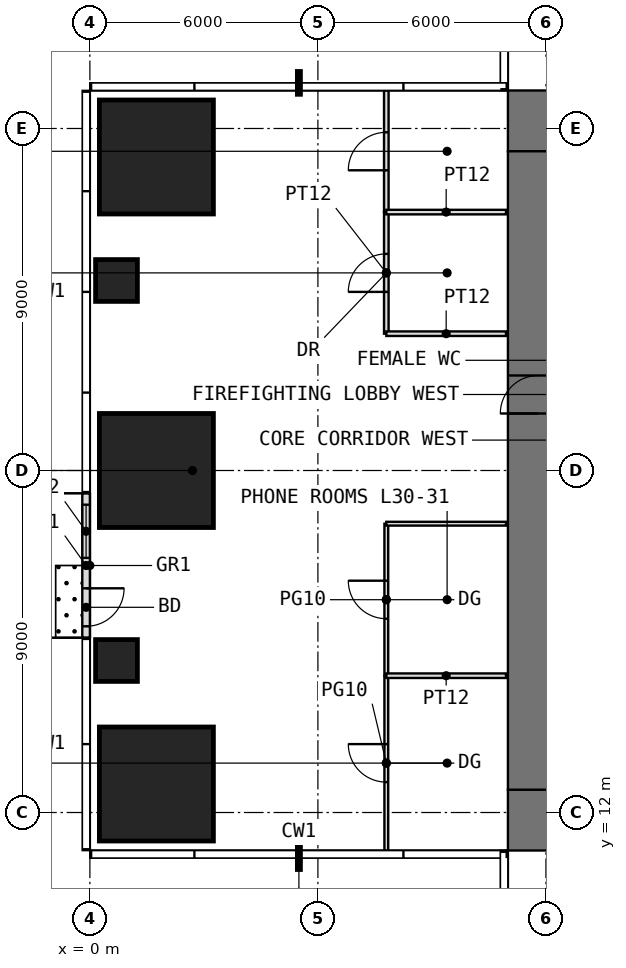
"""IFC4 building model, lengths in metres.
Left out: names, types, materials, properties, quantities, classifications, styles, units other than length and angle.
Written with IfcOpenShell. Run it as: python <this file> out.ifc"""

import sys

from ifc_helpers import new_model, si_unit, direction, frame, frame_2d, origin, origin_2d, place, context, subcontext, project, spatial, rectangle, extrude, element, fill, save


model = new_model("IFC4")
c1 = context("Model", 3, precision=1e-05, world=origin(), true_north=direction((0.0, 1.0)))
c2 = subcontext(c1, "Body", "Model", "MODEL_VIEW")
j1 = project(units=[si_unit("LENGTHUNIT", "METRE"), si_unit("PLANEANGLEUNIT", "RADIAN")], contexts=[c1])
p1 = place(None, origin())
s1 = spatial("IfcSite", under=j1, at=p1, CompositionType="ELEMENT")
p2 = place(p1, origin())
s2 = spatial("IfcBuilding", under=s1, at=p2, CompositionType="ELEMENT")
p3 = place(p2, frame((0.0, 0.0, 128.5)))
s3 = spatial("IfcBuildingStorey", under=s2, at=p3, CompositionType="ELEMENT", Elevation=128.5)
p4 = place(p3, frame((1.75, 12.75, 0.0), z_axis=(0.0, 0.0, 1.0), x_axis=(1.0, 0.0, 0.0)))
e1 = element("IfcColumn", 1, at=p4, inside=s3, PredefinedType="COLUMN", context=c2, shape_type="SweptSolid", body=[
    extrude(rectangle(XDim=3.0, YDim=3.0, at=origin_2d()), origin(), (0.0, 0.0, 1.0), 4.0),
])
p5 = place(p3, frame((0.7, 16.0, 0.0), z_axis=(0.0, 0.0, 1.0), x_axis=(1.0, 0.0, 0.0)))
e2 = element("IfcColumn", 2, at=p5, inside=s3, PredefinedType="COLUMN", context=c2, shape_type="SweptSolid", body=[
    extrude(rectangle(XDim=1.1, YDim=1.1, at=origin_2d()), origin(), (0.0, 0.0, 1.0), 4.0),
])
p6 = place(p3, frame((1.75, 21.0, 0.0), z_axis=(0.0, 0.0, 1.0), x_axis=(1.0, 0.0, 0.0)))
e3 = element("IfcColumn", 3, at=p6, inside=s3, PredefinedType="COLUMN", context=c2, shape_type="SweptSolid", body=[
    extrude(rectangle(XDim=3.0, YDim=3.0, at=origin_2d()), origin(), (0.0, 0.0, 1.0), 4.0),
])
p7 = place(p3, frame((0.7, 26.0, 0.0), z_axis=(0.0, 0.0, 1.0), x_axis=(1.0, 0.0, 0.0)))
e4 = element("IfcColumn", 4, at=p7, inside=s3, PredefinedType="COLUMN", context=c2, shape_type="SweptSolid", body=[
    extrude(rectangle(XDim=1.1, YDim=1.1, at=origin_2d()), origin(), (0.0, 0.0, 1.0), 4.0),
])
p8 = place(p3, frame((1.75, 29.25, 0.0), z_axis=(0.0, 0.0, 1.0), x_axis=(1.0, 0.0, 0.0)))
e5 = element("IfcColumn", 5, at=p8, inside=s3, PredefinedType="COLUMN", context=c2, shape_type="SweptSolid", body=[
    extrude(rectangle(XDim=3.0, YDim=3.0, at=origin_2d()), origin(), (0.0, 0.0, 1.0), 4.0),
])
p9 = place(p3, frame((-0.1, 20.4, 0.0), z_axis=(0.0, 0.0, 1.0), x_axis=(0.0, -1.0, 0.0)))
e6 = element("IfcWall", 6, at=p9, inside=s3, PredefinedType="USERDEFINED", context=c2, shape_type="SweptSolid", body=[
    extrude(rectangle(XDim=3.8, YDim=0.2, at=frame_2d((1.9, 0.0))), origin(), (0.0, 0.0, 1.0), 3.75),
])
p10 = place(p9, frame((2.5, 0.0, 0.0)))
e7 = element("IfcOpeningElement", 7, at=p10, cuts=e6, PredefinedType="OPENING", context=c2, shape_type="SweptSolid", body=[
    extrude(rectangle(XDim=1.0, YDim=2.4, at=frame_2d((0.5, 1.2))), frame((0.0, 0.11, 0.0), z_axis=(0.0, -1.0, 0.0), x_axis=(1.0, 0.0, 0.0)), (0.0, 0.0, 1.0), 0.22),
])
p11 = place(p9, frame((0.3, 0.0, 0.3)))
e8 = element("IfcOpeningElement", 8, at=p11, cuts=e6, PredefinedType="OPENING", context=c2, shape_type="SweptSolid", body=[
    extrude(rectangle(XDim=1.4, YDim=2.7, at=frame_2d((0.7, 1.35))), frame((0.0, 0.11, 0.0), z_axis=(0.0, -1.0, 0.0), x_axis=(1.0, 0.0, 0.0)), (0.0, 0.0, 1.0), 0.22),
])
p12 = place(p3, frame((11.0, 11.8, -0.05), z_axis=(0.0, 0.0, 1.0), x_axis=(1.0, 0.0, 0.0)))
e9 = element("IfcWall", 9, at=p12, inside=s3, PredefinedType="SHEAR", context=c2, shape_type="SweptSolid", body=[
    extrude(rectangle(XDim=20.0, YDim=1.6, at=frame_2d((10.0, 0.0))), origin(), (0.0, 0.0, 1.0), 4.0),
])
p13 = place(p12, frame((9.0, 0.0, 0.05)))
e10 = element("IfcOpeningElement", 10, at=p13, cuts=e9, PredefinedType="OPENING", context=c2, shape_type="SweptSolid", body=[
    extrude(rectangle(XDim=2.0, YDim=2.2, at=frame_2d((1.0, 1.1))), frame((0.0, 0.81, 0.0), z_axis=(0.0, -1.0, 0.0), x_axis=(1.0, 0.0, 0.0)), (0.0, 0.0, 1.0), 1.62),
])
p14 = place(p3, frame((11.0, 30.2, -0.05), z_axis=(0.0, 0.0, 1.0), x_axis=(1.0, 0.0, 0.0)))
e11 = element("IfcWall", 11, at=p14, inside=s3, PredefinedType="SHEAR", context=c2, shape_type="SweptSolid", body=[
    extrude(rectangle(XDim=20.0, YDim=1.6, at=frame_2d((10.0, 0.0))), origin(), (0.0, 0.0, 1.0), 4.0),
])
p15 = place(p14, frame((9.0, 0.0, 0.05)))
e12 = element("IfcOpeningElement", 12, at=p15, cuts=e11, PredefinedType="OPENING", context=c2, shape_type="SweptSolid", body=[
    extrude(rectangle(XDim=2.0, YDim=2.2, at=frame_2d((1.0, 1.1))), frame((0.0, 0.81, 0.0), z_axis=(0.0, -1.0, 0.0), x_axis=(1.0, 0.0, 0.0)), (0.0, 0.0, 1.0), 1.62),
])
p16 = place(p3, frame((11.8, 12.6, -0.05), z_axis=(0.0, 0.0, 1.0), x_axis=(0.0, 1.0, 0.0)))
e13 = element("IfcWall", 13, at=p16, inside=s3, PredefinedType="SHEAR", context=c2, shape_type="SweptSolid", body=[
    extrude(rectangle(XDim=16.8, YDim=1.6, at=frame_2d((8.4, 0.0))), origin(), (0.0, 0.0, 1.0), 4.0),
])
p17 = place(p16, frame((9.9, 0.0, 0.05)))
e14 = element("IfcOpeningElement", 14, at=p17, cuts=e13, PredefinedType="OPENING", context=c2, shape_type="SweptSolid", body=[
    extrude(rectangle(XDim=1.0, YDim=2.2, at=frame_2d((0.5, 1.1))), frame((0.0, 0.81, 0.0), z_axis=(0.0, -1.0, 0.0), x_axis=(1.0, 0.0, 0.0)), (0.0, 0.0, 1.0), 1.62),
])
p18 = place(p3, frame((7.8, 11.0, 0.0), z_axis=(0.0, 0.0, 1.0), x_axis=(0.0, 1.0, 0.0)))
e15 = element("IfcWall", 15, at=p18, inside=s3, PredefinedType="PARTITIONING", context=c2, shape_type="SweptSolid", body=[
    extrude(rectangle(XDim=4.6, YDim=0.1, at=frame_2d((2.3, 0.0))), origin(), (0.0, 0.0, 1.0), 3.75),
])
p19 = place(p18, frame((1.8, 0.0, 0.0)))
e16 = element("IfcOpeningElement", 16, at=p19, cuts=e15, PredefinedType="OPENING", context=c2, shape_type="SweptSolid", body=[
    extrude(rectangle(XDim=1.0, YDim=2.4, at=frame_2d((0.5, 1.2))), frame((0.0, 0.06, 0.0), z_axis=(0.0, -1.0, 0.0), x_axis=(1.0, 0.0, 0.0)), (0.0, 0.0, 1.0), 0.12),
])
p20 = place(p3, frame((7.8, 15.6, 0.0), z_axis=(0.0, 0.0, 1.0), x_axis=(0.0, 1.0, 0.0)))
e17 = element("IfcWall", 17, at=p20, inside=s3, PredefinedType="PARTITIONING", context=c2, shape_type="SweptSolid", body=[
    extrude(rectangle(XDim=4.0, YDim=0.1, at=frame_2d((2.0, 0.0))), origin(), (0.0, 0.0, 1.0), 3.75),
])
p21 = place(p20, frame((1.5, 0.0, 0.0)))
e18 = element("IfcOpeningElement", 18, at=p21, cuts=e17, PredefinedType="OPENING", context=c2, shape_type="SweptSolid", body=[
    extrude(rectangle(XDim=1.0, YDim=2.4, at=frame_2d((0.5, 1.2))), frame((0.0, 0.06, 0.0), z_axis=(0.0, -1.0, 0.0), x_axis=(1.0, 0.0, 0.0)), (0.0, 0.0, 1.0), 0.12),
])
p22 = place(p3, frame((7.8, 15.6, 0.0), z_axis=(0.0, 0.0, 1.0), x_axis=(1.0, 0.0, 0.0)))
e19 = element("IfcWall", 19, at=p22, inside=s3, PredefinedType="PARTITIONING", context=c2, shape_type="SweptSolid", body=[
    extrude(rectangle(XDim=3.15, YDim=0.12, at=frame_2d((1.575, 0.0))), origin(), (0.0, 0.0, 1.0), 3.75),
])
p23 = place(p3, frame((7.8, 19.6, 0.0), z_axis=(0.0, 0.0, 1.0), x_axis=(1.0, 0.0, 0.0)))
e20 = element("IfcWall", 20, at=p23, inside=s3, PredefinedType="PARTITIONING", context=c2, shape_type="SweptSolid", body=[
    extrude(rectangle(XDim=3.15, YDim=0.1, at=frame_2d((1.575, 0.0))), origin(), (0.0, 0.0, 1.0), 3.75),
])
p24 = place(p3, frame((7.8, 24.6, 0.0), z_axis=(0.0, 0.0, 1.0), x_axis=(0.0, 1.0, 0.0)))
e21 = element("IfcWall", 21, at=p24, inside=s3, PredefinedType="PARTITIONING", context=c2, shape_type="SweptSolid", body=[
    extrude(rectangle(XDim=3.2, YDim=0.12, at=frame_2d((1.6, 0.0))), origin(), (0.0, 0.0, 1.0), 3.75),
])
p25 = place(p24, frame((1.1, 0.0, 0.0)))
e22 = element("IfcOpeningElement", 22, at=p25, cuts=e21, PredefinedType="OPENING", context=c2, shape_type="SweptSolid", body=[
    extrude(rectangle(XDim=1.0, YDim=2.2, at=frame_2d((0.5, 1.1))), frame((0.0, 0.07, 0.0), z_axis=(0.0, -1.0, 0.0), x_axis=(1.0, 0.0, 0.0)), (0.0, 0.0, 1.0), 0.14),
])
p26 = place(p3, frame((7.8, 24.6, 0.0), z_axis=(0.0, 0.0, 1.0), x_axis=(1.0, 0.0, 0.0)))
e23 = element("IfcWall", 23, at=p26, inside=s3, PredefinedType="PARTITIONING", context=c2, shape_type="SweptSolid", body=[
    extrude(rectangle(XDim=3.15, YDim=0.12, at=frame_2d((1.575, 0.0))), origin(), (0.0, 0.0, 1.0), 3.75),
])
p27 = place(p3, frame((7.8, 27.8, 0.0), z_axis=(0.0, 0.0, 1.0), x_axis=(0.0, 1.0, 0.0)))
e24 = element("IfcWall", 24, at=p27, inside=s3, PredefinedType="PARTITIONING", context=c2, shape_type="SweptSolid", body=[
    extrude(rectangle(XDim=3.2, YDim=0.12, at=frame_2d((1.6, 0.0))), origin(), (0.0, 0.0, 1.0), 3.75),
])
p28 = place(p27, frame((1.1, 0.0, 0.0)))
e25 = element("IfcOpeningElement", 25, at=p28, cuts=e24, PredefinedType="OPENING", context=c2, shape_type="SweptSolid", body=[
    extrude(rectangle(XDim=1.0, YDim=2.2, at=frame_2d((0.5, 1.1))), frame((0.0, 0.07, 0.0), z_axis=(0.0, -1.0, 0.0), x_axis=(1.0, 0.0, 0.0)), (0.0, 0.0, 1.0), 0.14),
])
p29 = place(p3, frame((7.8, 27.8, 0.0), z_axis=(0.0, 0.0, 1.0), x_axis=(1.0, 0.0, 0.0)))
e26 = element("IfcWall", 26, at=p29, inside=s3, PredefinedType="PARTITIONING", context=c2, shape_type="SweptSolid", body=[
    extrude(rectangle(XDim=3.15, YDim=0.12, at=frame_2d((1.575, 0.0))), origin(), (0.0, 0.0, 1.0), 3.75),
])
p30 = place(p10, origin())
e27 = element("IfcDoor", 27, at=p30, inside=s3, OperationType="SINGLE_SWING_LEFT", PredefinedType="DOOR", context=c2, shape_type="SweptSolid", body=[
    extrude(rectangle(XDim=1.0, YDim=2.4, at=frame_2d((0.5, 1.2))), frame((0.0, 0.025, 0.0), z_axis=(0.0, -1.0, 0.0), x_axis=(1.0, 0.0, 0.0)), (0.0, 0.0, 1.0), 0.05),
])
fill(e7, e27)
p31 = place(p11, origin())
e28 = element("IfcWindow", 28, at=p31, inside=s3, PartitioningType="SINGLE_PANEL", PredefinedType="WINDOW", context=c2, shape_type="SweptSolid", body=[
    extrude(rectangle(XDim=1.4, YDim=2.7, at=frame_2d((0.7, 1.35))), frame((0.0, 0.03, 0.0), z_axis=(0.0, -1.0, 0.0), x_axis=(1.0, 0.0, 0.0)), (0.0, 0.0, 1.0), 0.06),
])
fill(e8, e28)
p32 = place(p17, origin())
e29 = element("IfcDoor", 29, at=p32, inside=s3, OperationType="SINGLE_SWING_LEFT", PredefinedType="DOOR", context=c2, shape_type="SweptSolid", body=[
    extrude(rectangle(XDim=1.0, YDim=2.2, at=frame_2d((0.5, 1.1))), frame((0.0, 0.025, 0.0), z_axis=(0.0, -1.0, 0.0), x_axis=(1.0, 0.0, 0.0)), (0.0, 0.0, 1.0), 0.05),
])
fill(e14, e29)
p33 = place(p19, origin())
e30 = element("IfcDoor", 30, at=p33, inside=s3, OperationType="SINGLE_SWING_RIGHT", PredefinedType="DOOR", context=c2, shape_type="SweptSolid", body=[
    extrude(rectangle(XDim=1.0, YDim=2.4, at=frame_2d((0.5, 1.2))), frame((0.0, 0.025, 0.0), z_axis=(0.0, -1.0, 0.0), x_axis=(1.0, 0.0, 0.0)), (0.0, 0.0, 1.0), 0.05),
])
fill(e16, e30)
p34 = place(p21, origin())
e31 = element("IfcDoor", 31, at=p34, inside=s3, OperationType="SINGLE_SWING_RIGHT", PredefinedType="DOOR", context=c2, shape_type="SweptSolid", body=[
    extrude(rectangle(XDim=1.0, YDim=2.4, at=frame_2d((0.5, 1.2))), frame((0.0, 0.025, 0.0), z_axis=(0.0, -1.0, 0.0), x_axis=(1.0, 0.0, 0.0)), (0.0, 0.0, 1.0), 0.05),
])
fill(e18, e31)
p35 = place(p25, origin())
e32 = element("IfcDoor", 32, at=p35, inside=s3, OperationType="SINGLE_SWING_LEFT", PredefinedType="DOOR", context=c2, shape_type="SweptSolid", body=[
    extrude(rectangle(XDim=1.0, YDim=2.2, at=frame_2d((0.5, 1.1))), frame((0.0, 0.025, 0.0), z_axis=(0.0, -1.0, 0.0), x_axis=(1.0, 0.0, 0.0)), (0.0, 0.0, 1.0), 0.05),
])
fill(e22, e32)
p36 = place(p28, origin())
e33 = element("IfcDoor", 33, at=p36, inside=s3, OperationType="SINGLE_SWING_LEFT", PredefinedType="DOOR", context=c2, shape_type="SweptSolid", body=[
    extrude(rectangle(XDim=1.0, YDim=2.2, at=frame_2d((0.5, 1.1))), frame((0.0, 0.025, 0.0), z_axis=(0.0, -1.0, 0.0), x_axis=(1.0, 0.0, 0.0)), (0.0, 0.0, 1.0), 0.05),
])
fill(e25, e33)
save(model, sys.argv[1])
